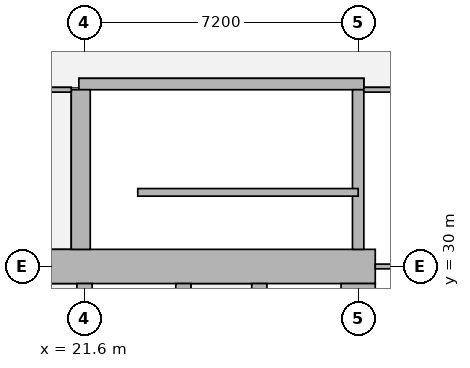
"""IFC4 building model, lengths in metres.
Left out: names, types, materials, properties, quantities, classifications, styles, units other than length and angle.
Written with IfcOpenShell. Run it as: python <this file> out.ifc"""

import sys

from ifc_helpers import new_model, si_unit, direction, frame, frame_2d, origin, place, context, subcontext, project, spatial, rectangle, extrude, element, fill, save


model = new_model("IFC4")
c1 = context("Model", 3, precision=1e-05, world=origin(), true_north=direction((0.0, 1.0)))
c2 = subcontext(c1, "Body", "Model", "MODEL_VIEW")
j1 = project(units=[si_unit("LENGTHUNIT", "METRE"), si_unit("PLANEANGLEUNIT", "RADIAN")], contexts=[c1])
p1 = place(None, origin())
s1 = spatial("IfcSite", under=j1, at=p1, CompositionType="ELEMENT")
p2 = place(p1, origin())
s2 = spatial("IfcBuilding", under=s1, at=p2, CompositionType="ELEMENT")
p3 = place(p2, frame((0.0, 0.0, 139.55)))
s3 = spatial("IfcBuildingStorey", under=s2, at=p3, CompositionType="ELEMENT", Elevation=139.55)
p4 = place(p3, frame((13.95, 30.0, 0.0), z_axis=(0.0, 0.0, 1.0), x_axis=(1.0, 0.0, 0.0)))
e1 = element("IfcWall", 1, at=p4, inside=s3, PredefinedType="SHEAR", context=c2, shape_type="SweptSolid", body=[
    extrude(rectangle(XDim=15.3, YDim=0.9, at=frame_2d((7.65, 0.0))), origin(), (0.0, 0.0, 1.0), 3.75),
])
p5 = place(p4, frame((4.45, 0.0, 0.0)))
e2 = element("IfcOpeningElement", 2, at=p5, cuts=e1, PredefinedType="OPENING", context=c2, shape_type="SweptSolid", body=[
    extrude(rectangle(XDim=1.8, YDim=2.1, at=frame_2d((0.9, 1.05))), frame((0.0, 0.46, 0.0), z_axis=(0.0, -1.0, 0.0), x_axis=(1.0, 0.0, 0.0)), (0.0, 0.0, 1.0), 0.92),
])
p6 = place(p4, frame((10.7, 0.0, 0.0)))
e3 = element("IfcOpeningElement", 3, at=p6, cuts=e1, PredefinedType="OPENING", context=c2, shape_type="SweptSolid", body=[
    extrude(rectangle(XDim=1.1, YDim=2.1, at=frame_2d((0.55, 1.05))), frame((0.0, 0.46, 0.0), z_axis=(0.0, -1.0, 0.0), x_axis=(1.0, 0.0, 0.0)), (0.0, 0.0, 1.0), 0.92),
])
p7 = place(p3, frame((28.8, 15.45, 0.0), z_axis=(0.0, 0.0, 1.0), x_axis=(0.0, 1.0, 0.0)))
e4 = element("IfcWall", 4, at=p7, inside=s3, PredefinedType="SHEAR", context=c2, shape_type="SweptSolid", body=[
    extrude(rectangle(XDim=14.1, YDim=0.9, at=frame_2d((7.05, 0.0))), origin(), (0.0, 0.0, 1.0), 3.75),
])
p8 = place(p3, frame((21.6, 15.45, 0.0), z_axis=(0.0, 0.0, 1.0), x_axis=(0.0, 1.0, 0.0)))
e5 = element("IfcWall", 5, at=p8, inside=s3, PredefinedType="SHEAR", context=c2, shape_type="SweptSolid", body=[
    extrude(rectangle(XDim=14.1, YDim=0.4, at=frame_2d((7.05, 0.0))), origin(), (0.0, 0.0, 1.0), 3.75),
])
p9 = place(p8, frame((0.875, 0.0, 0.0)))
e6 = element("IfcOpeningElement", 6, at=p9, cuts=e5, PredefinedType="OPENING", context=c2, shape_type="SweptSolid", body=[
    extrude(rectangle(XDim=1.1, YDim=2.1, at=frame_2d((0.55, 1.05))), frame((0.0, 0.21, 0.0), z_axis=(0.0, -1.0, 0.0), x_axis=(1.0, 0.0, 0.0)), (0.0, 0.0, 1.0), 0.42),
])
p10 = place(p8, frame((4.625, 0.0, 0.0)))
e7 = element("IfcOpeningElement", 7, at=p10, cuts=e5, PredefinedType="OPENING", context=c2, shape_type="SweptSolid", body=[
    extrude(rectangle(XDim=1.1, YDim=2.1, at=frame_2d((0.55, 1.05))), frame((0.0, 0.21, 0.0), z_axis=(0.0, -1.0, 0.0), x_axis=(1.0, 0.0, 0.0)), (0.0, 0.0, 1.0), 0.42),
])
p11 = place(p8, frame((8.375, 0.0, 0.0)))
e8 = element("IfcOpeningElement", 8, at=p11, cuts=e5, PredefinedType="OPENING", context=c2, shape_type="SweptSolid", body=[
    extrude(rectangle(XDim=1.1, YDim=2.1, at=frame_2d((0.55, 1.05))), frame((0.0, 0.21, 0.0), z_axis=(0.0, -1.0, 0.0), x_axis=(1.0, 0.0, 0.0)), (0.0, 0.0, 1.0), 0.42),
])
p12 = place(p8, frame((12.125, 0.0, 0.0)))
e9 = element("IfcOpeningElement", 9, at=p12, cuts=e5, PredefinedType="OPENING", context=c2, shape_type="SweptSolid", body=[
    extrude(rectangle(XDim=1.1, YDim=2.1, at=frame_2d((0.55, 1.05))), frame((0.0, 0.21, 0.0), z_axis=(0.0, -1.0, 0.0), x_axis=(1.0, 0.0, 0.0)), (0.0, 0.0, 1.0), 0.42),
])
p13 = place(p3, frame((24.2, 15.45, 0.0), z_axis=(0.0, 0.0, 1.0), x_axis=(0.0, 1.0, 0.0)))
e10 = element("IfcWall", 10, at=p13, inside=s3, PredefinedType="SHEAR", context=c2, shape_type="SweptSolid", body=[
    extrude(rectangle(XDim=14.1, YDim=0.4, at=frame_2d((7.05, 0.0))), origin(), (0.0, 0.0, 1.0), 3.75),
])
p14 = place(p3, frame((26.2, 26.45, 0.0), z_axis=(0.0, 0.0, 1.0), x_axis=(0.0, 1.0, 0.0)))
e11 = element("IfcWall", 11, at=p14, inside=s3, PredefinedType="SHEAR", context=c2, shape_type="SweptSolid", body=[
    extrude(rectangle(XDim=3.1, YDim=0.4, at=frame_2d((1.55, 0.0))), origin(), (0.0, 0.0, 1.0), 3.75),
])
p15 = place(p14, frame((1.075, 0.0, 0.0)))
e12 = element("IfcOpeningElement", 12, at=p15, cuts=e11, PredefinedType="OPENING", context=c2, shape_type="SweptSolid", body=[
    extrude(rectangle(XDim=1.2, YDim=2.1, at=frame_2d((0.6, 1.05))), frame((0.0, 0.21, 0.0), z_axis=(0.0, -1.0, 0.0), x_axis=(1.0, 0.0, 0.0)), (0.0, 0.0, 1.0), 0.42),
])
p16 = place(p3, frame((21.45, 34.8, 0.0), z_axis=(0.0, 0.0, 1.0), x_axis=(1.0, 0.0, 0.0)))
e13 = element("IfcWall", 13, at=p16, inside=s3, PredefinedType="SHEAR", context=c2, shape_type="SweptSolid", body=[
    extrude(rectangle(XDim=7.5, YDim=0.3, at=frame_2d((3.75, 0.0))), origin(), (0.0, 0.0, 1.0), 3.75),
])
p17 = place(p16, frame((0.5, 0.0, 0.0)))
e14 = element("IfcOpeningElement", 14, at=p17, cuts=e13, PredefinedType="OPENING", context=c2, shape_type="SweptSolid", body=[
    extrude(rectangle(XDim=1.1, YDim=2.1, at=frame_2d((0.55, 1.05))), frame((0.0, 0.16, 0.0), z_axis=(0.0, -1.0, 0.0), x_axis=(1.0, 0.0, 0.0)), (0.0, 0.0, 1.0), 0.32),
])
p18 = place(p3, frame((21.5, 30.45, 0.0), z_axis=(0.0, 0.0, 1.0), x_axis=(0.0, 1.0, 0.0)))
e15 = element("IfcWall", 15, at=p18, inside=s3, PredefinedType="SHEAR", context=c2, shape_type="SweptSolid", body=[
    extrude(rectangle(XDim=4.2, YDim=0.5, at=frame_2d((2.1, 0.0))), origin(), (0.0, 0.0, 1.0), 3.75),
])
p19 = place(p3, frame((28.8, 30.45, 0.0), z_axis=(0.0, 0.0, 1.0), x_axis=(0.0, 1.0, 0.0)))
e16 = element("IfcWall", 16, at=p19, inside=s3, PredefinedType="SHEAR", context=c2, shape_type="SweptSolid", body=[
    extrude(rectangle(XDim=4.2, YDim=0.3, at=frame_2d((2.1, 0.0))), origin(), (0.0, 0.0, 1.0), 3.75),
])
p20 = place(p3, frame((10.413, 34.65, 0.0), z_axis=(0.0, 0.0, 1.0), x_axis=(1.0, 0.0, 0.0)))
e17 = element("IfcWall", 17, at=p20, inside=s3, PredefinedType="PARTITIONING", context=c2, shape_type="SweptSolid", body=[
    extrude(rectangle(XDim=10.837, YDim=0.125, at=frame_2d((5.418, 0.0))), origin(), (0.0, 0.0, 1.0), 3.5),
])
p21 = place(p20, frame((7.487, 0.0, 0.0)))
e18 = element("IfcOpeningElement", 18, at=p21, cuts=e17, PredefinedType="OPENING", context=c2, shape_type="SweptSolid", body=[
    extrude(rectangle(XDim=1.8, YDim=2.1, at=frame_2d((0.9, 1.05))), frame((0.0, 0.073, 0.0), z_axis=(0.0, -1.0, 0.0), x_axis=(1.0, 0.0, 0.0)), (0.0, 0.0, 1.0), 0.145),
])
p22 = place(p3, frame((28.95, 34.65, 0.0), z_axis=(0.0, 0.0, 1.0), x_axis=(1.0, 0.0, 0.0)))
e19 = element("IfcWall", 19, at=p22, inside=s3, PredefinedType="PARTITIONING", context=c2, shape_type="SweptSolid", body=[
    extrude(rectangle(XDim=4.423, YDim=0.125, at=frame_2d((2.211, 0.0))), origin(), (0.0, 0.0, 1.0), 3.5),
])
p23 = place(p3, frame((29.25, 30.0, 0.0), z_axis=(0.0, 0.0, 1.0), x_axis=(1.0, 0.0, 0.0)))
e20 = element("IfcWall", 20, at=p23, inside=s3, PredefinedType="PARTITIONING", context=c2, shape_type="SweptSolid", body=[
    extrude(rectangle(XDim=2.342, YDim=0.125, at=frame_2d((1.171, 0.0))), origin(), (0.0, 0.0, 1.0), 3.5),
])
p24 = place(p3, frame((23.0, 31.95, 0.0), z_axis=(0.0, 0.0, 1.0), x_axis=(1.0, 0.0, 0.0)))
e21 = element("IfcWall", 21, at=p24, inside=s3, PredefinedType="SHEAR", context=c2, shape_type="SweptSolid", body=[
    extrude(rectangle(XDim=5.8, YDim=0.2, at=frame_2d((2.9, 0.0))), origin(), (0.0, 0.0, 1.0), 3.75),
])
p25 = place(p6, origin())
e22 = element("IfcDoor", 22, at=p25, inside=s3, OperationType="SINGLE_SWING_RIGHT", PredefinedType="DOOR", context=c2, shape_type="SweptSolid", body=[
    extrude(rectangle(XDim=1.1, YDim=2.1, at=frame_2d((0.55, 1.05))), frame((0.0, 0.025, 0.0), z_axis=(0.0, -1.0, 0.0), x_axis=(1.0, 0.0, 0.0)), (0.0, 0.0, 1.0), 0.05),
])
fill(e3, e22)
p26 = place(p17, origin())
e23 = element("IfcDoor", 23, at=p26, inside=s3, OperationType="SINGLE_SWING_RIGHT", PredefinedType="DOOR", context=c2, shape_type="SweptSolid", body=[
    extrude(rectangle(XDim=1.1, YDim=2.1, at=frame_2d((0.55, 1.05))), frame((0.0, 0.025, 0.0), z_axis=(0.0, -1.0, 0.0), x_axis=(1.0, 0.0, 0.0)), (0.0, 0.0, 1.0), 0.05),
])
fill(e14, e23)
save(model, sys.argv[1])
